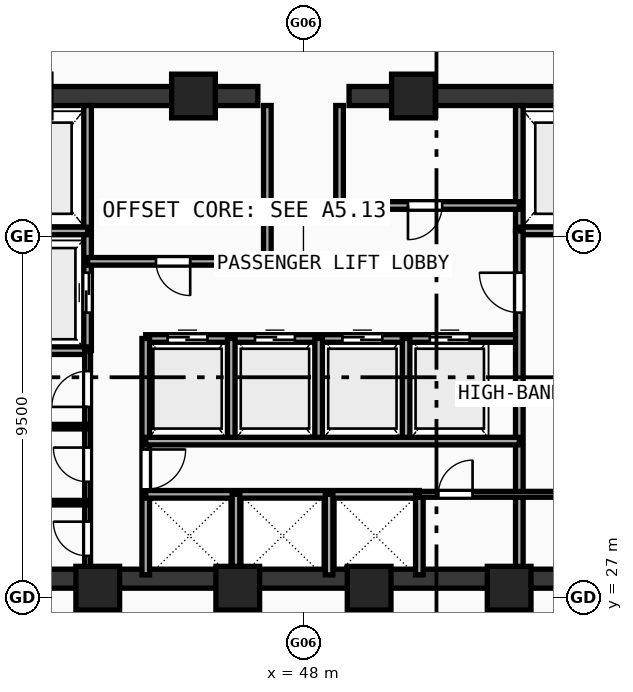
"""IFC4 building model, lengths in metres.
Left out: names, types, materials, properties, quantities, classifications, styles, units other than length and angle.
Written with IfcOpenShell. Run it as: python <this file> out.ifc"""

import sys

from ifc_helpers import new_model, si_unit, direction, frame, frame_2d, origin, origin_with_axes, origin_2d, place, context, subcontext, project, spatial, rectangle, hollow_rectangle, extrude, source, transform, mapped, element, fill, save


model = new_model("IFC4")
c1 = context("Model", 3, precision=1e-05, world=origin(), true_north=direction((0.0, 1.0)))
c2 = subcontext(c1, "Body", "Model", "MODEL_VIEW")
j1 = project(units=[si_unit("LENGTHUNIT", "METRE"), si_unit("PLANEANGLEUNIT", "RADIAN")], contexts=[c1])
p1 = place(None, origin())
s1 = spatial("IfcSite", under=j1, at=p1, CompositionType="ELEMENT")
p2 = place(p1, origin())
s2 = spatial("IfcBuilding", under=s1, at=p2, CompositionType="ELEMENT")
p3 = place(p2, frame((0.0, 0.0, 199.96)))
s3 = spatial("IfcBuildingStorey", under=s2, at=p3, CompositionType="ELEMENT", Elevation=199.96)
p4 = place(p3, frame((35.55, 27.5, 0.0), z_axis=(0.0, 0.0, 1.0), x_axis=(1.0, 0.0, 0.0)))
e1 = element("IfcWall", 1, at=p4, inside=s3, PredefinedType="SHEAR", context=c2, shape_type="SweptSolid", body=[
    extrude(rectangle(XDim=24.9, YDim=0.5, at=frame_2d((12.45, 0.0))), origin(), (0.0, 0.0, 1.0), 3.54),
])
p5 = place(p3, frame((35.55, 40.2, 0.0), z_axis=(0.0, 0.0, 1.0), x_axis=(1.0, 0.0, 0.0)))
e2 = element("IfcWall", 2, at=p5, inside=s3, PredefinedType="SHEAR", context=c2, shape_type="SweptSolid", body=[
    extrude(rectangle(XDim=11.25, YDim=0.5, at=frame_2d((5.625, 0.0))), origin(), (0.0, 0.0, 1.0), 3.54),
])
p6 = place(p5, frame((1.6, 0.0, 0.0)))
e3 = element("IfcOpeningElement", 3, at=p6, cuts=e2, PredefinedType="OPENING", context=c2, shape_type="SweptSolid", body=[
    extrude(rectangle(XDim=1.05, YDim=2.1, at=frame_2d((0.525, 1.05))), frame((0.0, 0.26, 0.0), z_axis=(0.0, -1.0, 0.0), x_axis=(1.0, 0.0, 0.0)), (0.0, 0.0, 1.0), 0.52),
])
p7 = place(p3, frame((49.2, 40.2, 0.0), z_axis=(0.0, 0.0, 1.0), x_axis=(1.0, 0.0, 0.0)))
e4 = element("IfcWall", 4, at=p7, inside=s3, PredefinedType="SHEAR", context=c2, shape_type="SweptSolid", body=[
    extrude(rectangle(XDim=11.25, YDim=0.5, at=frame_2d((5.625, 0.0))), origin(), (0.0, 0.0, 1.0), 3.54),
])
p8 = place(p7, frame((8.6, 0.0, 0.0)))
e5 = element("IfcOpeningElement", 5, at=p8, cuts=e4, PredefinedType="OPENING", context=c2, shape_type="SweptSolid", body=[
    extrude(rectangle(XDim=1.05, YDim=2.1, at=frame_2d((0.525, 1.05))), frame((0.0, 0.26, 0.0), z_axis=(0.0, -1.0, 0.0), x_axis=(1.0, 0.0, 0.0)), (0.0, 0.0, 1.0), 0.52),
])
m1 = source(origin(), c2, "Body", "SweptSolid", [
    extrude(hollow_rectangle(XDim=1.15, YDim=1.15, WallThickness=0.048, at=origin_2d()), origin(), (0.0, 0.0, 1.0), 3.8),
])
for number, where, z_axis, x_axis in (
    (6, (42.588, 27.25, -0.26), (0.0, 0.0, 1.0), (1.0, 0.0, 0.0)),
    (7, (46.272, 27.25, -0.26), (0.0, 0.0, 1.0), (1.0, 0.0, 0.0)),
    (8, (49.729, 27.25, -0.26), (0.0, 0.0, 1.0), (1.0, 0.0, 0.0)),
    (9, (53.412, 27.25, -0.26), (0.0, 0.0, 1.0), (1.0, 0.0, 0.0)),
    (10, (50.894, 40.2, -0.26), (0.0, 0.0, 1.0), (1.0, 0.0, 0.0)),
    (11, (45.106, 40.2, -0.26), (0.0, 0.0, 1.0), (1.0, 0.0, 0.0)),
):
    element("IfcColumn", number, at=place(p3, frame(where, z_axis=z_axis, x_axis=x_axis)), inside=s3, PredefinedType="COLUMN", context=c2, shape_type="MappedRepresentation", body=[
        mapped(m1, transform((0.0, 0.0, 0.0), scale=1.0)),
    ])
p9 = place(p3, frame((42.32, 33.5, 0.0), z_axis=(0.0, 0.0, 1.0), x_axis=(0.0, 1.0, 0.0)))
e12 = element("IfcWall", 12, at=p9, inside=s3, PredefinedType="SOLIDWALL", context=c2, shape_type="SweptSolid", body=[
    extrude(rectangle(XDim=6.45, YDim=0.2, at=frame_2d((3.225, 0.0))), origin(), (0.0, 0.0, 1.0), 3.54),
])
p10 = place(p9, frame((1.0, 0.0, 0.0)))
e13 = element("IfcOpeningElement", 13, at=p10, cuts=e12, PredefinedType="OPENING", context=c2, shape_type="SweptSolid", body=[
    extrude(rectangle(XDim=1.05, YDim=2.1, at=frame_2d((0.525, 1.05))), frame((0.0, 0.11, 0.0), z_axis=(0.0, -1.0, 0.0), x_axis=(1.0, 0.0, 0.0)), (0.0, 0.0, 1.0), 0.22),
])
for number, where, z_axis, x_axis in (
    (14, (39.6, 36.65, 0.0), (0.0, 0.0, 1.0), (1.0, 0.0, 0.0)),
    (15, (39.6, 33.5, 0.0), (0.0, 0.0, 1.0), (1.0, 0.0, 0.0)),
):
    element("IfcWall", number, at=place(p3, frame(where, z_axis=z_axis, x_axis=x_axis)), inside=s3, PredefinedType="SOLIDWALL", context=c2, shape_type="SweptSolid", body=[
        extrude(rectangle(XDim=2.72, YDim=0.2, at=frame_2d((1.36, 0.0))), origin(), (0.0, 0.0, 1.0), 3.54),
    ])
p11 = place(p3, frame((53.68, 36.65, 0.0), z_axis=(0.0, 0.0, 1.0), x_axis=(0.0, 1.0, 0.0)))
e16 = element("IfcWall", 16, at=p11, inside=s3, PredefinedType="SOLIDWALL", context=c2, shape_type="SweptSolid", body=[
    extrude(rectangle(XDim=3.3, YDim=0.2, at=frame_2d((1.65, 0.0))), origin(), (0.0, 0.0, 1.0), 3.54),
])
p12 = place(p3, frame((53.68, 36.65, 0.0), z_axis=(0.0, 0.0, 1.0), x_axis=(1.0, 0.0, 0.0)))
e17 = element("IfcWall", 17, at=p12, inside=s3, PredefinedType="SOLIDWALL", context=c2, shape_type="SweptSolid", body=[
    extrude(rectangle(XDim=2.72, YDim=0.2, at=frame_2d((1.36, 0.0))), origin(), (0.0, 0.0, 1.0), 3.54),
])
p13 = place(p3, frame((42.32, 35.85, 0.0), z_axis=(0.0, 0.0, 1.0), x_axis=(1.0, 0.0, 0.0)))
e18 = element("IfcWall", 18, at=p13, inside=s3, PredefinedType="SOLIDWALL", context=c2, shape_type="SweptSolid", body=[
    extrude(rectangle(XDim=4.73, YDim=0.2, at=frame_2d((2.365, 0.0))), origin(), (0.0, 0.0, 1.0), 3.54),
])
p14 = place(p13, frame((1.8, 0.0, 0.0)))
e19 = element("IfcOpeningElement", 19, at=p14, cuts=e18, PredefinedType="OPENING", context=c2, shape_type="SweptSolid", body=[
    extrude(rectangle(XDim=0.9, YDim=2.1, at=frame_2d((0.45, 1.05))), frame((0.0, 0.11, 0.0), z_axis=(0.0, -1.0, 0.0), x_axis=(1.0, 0.0, 0.0)), (0.0, 0.0, 1.0), 0.22),
])
p15 = place(p3, frame((48.95, 37.32, 0.0), z_axis=(0.0, 0.0, 1.0), x_axis=(1.0, 0.0, 0.0)))
e20 = element("IfcWall", 20, at=p15, inside=s3, PredefinedType="SOLIDWALL", context=c2, shape_type="SweptSolid", body=[
    extrude(rectangle(XDim=4.73, YDim=0.2, at=frame_2d((2.365, 0.0))), origin(), (0.0, 0.0, 1.0), 3.54),
])
p16 = place(p15, frame((1.8, 0.0, 0.0)))
e21 = element("IfcOpeningElement", 21, at=p16, cuts=e20, PredefinedType="OPENING", context=c2, shape_type="SweptSolid", body=[
    extrude(rectangle(XDim=0.9, YDim=2.1, at=frame_2d((0.45, 1.05))), frame((0.0, 0.11, 0.0), z_axis=(0.0, -1.0, 0.0), x_axis=(1.0, 0.0, 0.0)), (0.0, 0.0, 1.0), 0.22),
])
p17 = place(p3, frame((47.05, 35.85, 0.0), z_axis=(0.0, 0.0, 1.0), x_axis=(0.0, 1.0, 0.0)))
e22 = element("IfcWall", 22, at=p17, inside=s3, PredefinedType="SOLIDWALL", context=c2, shape_type="SweptSolid", body=[
    extrude(rectangle(XDim=4.1, YDim=0.2, at=frame_2d((2.05, 0.0))), origin(), (0.0, 0.0, 1.0), 3.54),
])
p18 = place(p3, frame((48.95, 37.32, 0.0), z_axis=(0.0, 0.0, 1.0), x_axis=(0.0, 1.0, 0.0)))
e23 = element("IfcWall", 23, at=p18, inside=s3, PredefinedType="SOLIDWALL", context=c2, shape_type="SweptSolid", body=[
    extrude(rectangle(XDim=2.63, YDim=0.2, at=frame_2d((1.315, 0.0))), origin(), (0.0, 0.0, 1.0), 3.54),
])
p19 = place(p3, frame((43.85, 33.82, 0.0), z_axis=(0.0, 0.0, 1.0), x_axis=(1.0, 0.0, 0.0)))
e24 = element("IfcWall", 24, at=p19, inside=s3, PredefinedType="SOLIDWALL", context=c2, shape_type="SweptSolid", body=[
    extrude(rectangle(XDim=9.83, YDim=0.2, at=frame_2d((4.915, 0.0))), origin(), (0.0, 0.0, 1.0), 3.54),
])
p20 = place(p19, frame((0.575, 0.0, 0.0)))
e25 = element("IfcOpeningElement", 25, at=p20, cuts=e24, PredefinedType="OPENING", context=c2, shape_type="SweptSolid", body=[
    extrude(rectangle(XDim=1.05, YDim=2.1, at=frame_2d((0.525, 1.05))), frame((0.0, 0.11, 0.0), z_axis=(0.0, -1.0, 0.0), x_axis=(1.0, 0.0, 0.0)), (0.0, 0.0, 1.0), 0.22),
])
p21 = place(p19, frame((2.875, 0.0, 0.0)))
e26 = element("IfcOpeningElement", 26, at=p21, cuts=e24, PredefinedType="OPENING", context=c2, shape_type="SweptSolid", body=[
    extrude(rectangle(XDim=1.05, YDim=2.1, at=frame_2d((0.525, 1.05))), frame((0.0, 0.11, 0.0), z_axis=(0.0, -1.0, 0.0), x_axis=(1.0, 0.0, 0.0)), (0.0, 0.0, 1.0), 0.22),
])
p22 = place(p19, frame((5.175, 0.0, 0.0)))
e27 = element("IfcOpeningElement", 27, at=p22, cuts=e24, PredefinedType="OPENING", context=c2, shape_type="SweptSolid", body=[
    extrude(rectangle(XDim=1.05, YDim=2.1, at=frame_2d((0.525, 1.05))), frame((0.0, 0.11, 0.0), z_axis=(0.0, -1.0, 0.0), x_axis=(1.0, 0.0, 0.0)), (0.0, 0.0, 1.0), 0.22),
])
p23 = place(p19, frame((7.475, 0.0, 0.0)))
e28 = element("IfcOpeningElement", 28, at=p23, cuts=e24, PredefinedType="OPENING", context=c2, shape_type="SweptSolid", body=[
    extrude(rectangle(XDim=1.05, YDim=2.1, at=frame_2d((0.525, 1.05))), frame((0.0, 0.11, 0.0), z_axis=(0.0, -1.0, 0.0), x_axis=(1.0, 0.0, 0.0)), (0.0, 0.0, 1.0), 0.22),
])
p24 = place(p3, frame((43.85, 27.6, 0.0), z_axis=(0.0, 0.0, 1.0), x_axis=(0.0, 1.0, 0.0)))
e29 = element("IfcWall", 29, at=p24, inside=s3, PredefinedType="SOLIDWALL", context=c2, shape_type="SweptSolid", body=[
    extrude(rectangle(XDim=6.22, YDim=0.2, at=frame_2d((3.11, 0.0))), origin(), (0.0, 0.0, 1.0), 3.54),
])
p25 = place(p24, frame((2.25, 0.0, 0.0)))
e30 = element("IfcOpeningElement", 30, at=p25, cuts=e29, PredefinedType="OPENING", context=c2, shape_type="SweptSolid", body=[
    extrude(rectangle(XDim=1.05, YDim=2.1, at=frame_2d((0.525, 1.05))), frame((0.0, 0.11, 0.0), z_axis=(0.0, -1.0, 0.0), x_axis=(1.0, 0.0, 0.0)), (0.0, 0.0, 1.0), 0.22),
])
p26 = place(p3, frame((53.68, 27.6, 0.0), z_axis=(0.0, 0.0, 1.0), x_axis=(0.0, 1.0, 0.0)))
e31 = element("IfcWall", 31, at=p26, inside=s3, PredefinedType="SOLIDWALL", context=c2, shape_type="SweptSolid", body=[
    extrude(rectangle(XDim=9.05, YDim=0.2, at=frame_2d((4.525, 0.0))), origin(), (0.0, 0.0, 1.0), 3.54),
])
p27 = place(p26, frame((6.9, 0.0, 0.0)))
e32 = element("IfcOpeningElement", 32, at=p27, cuts=e31, PredefinedType="OPENING", context=c2, shape_type="SweptSolid", body=[
    extrude(rectangle(XDim=1.05, YDim=2.1, at=frame_2d((0.525, 1.05))), frame((0.0, 0.11, 0.0), z_axis=(0.0, -1.0, 0.0), x_axis=(1.0, 0.0, 0.0)), (0.0, 0.0, 1.0), 0.22),
])
for number, where, z_axis, x_axis in (
    (33, (46.1, 31.12, 0.0), (0.0, 0.0, 1.0), (0.0, 1.0, 0.0)),
    (34, (48.4, 31.12, 0.0), (0.0, 0.0, 1.0), (0.0, 1.0, 0.0)),
    (35, (50.7, 31.12, 0.0), (0.0, 0.0, 1.0), (0.0, 1.0, 0.0)),
):
    element("IfcWall", number, at=place(p3, frame(where, z_axis=z_axis, x_axis=x_axis)), inside=s3, PredefinedType="SOLIDWALL", context=c2, shape_type="SweptSolid", body=[
        extrude(rectangle(XDim=2.7, YDim=0.2, at=frame_2d((1.35, 0.0))), origin(), (0.0, 0.0, 1.0), 3.54),
    ])
p28 = place(p3, frame((43.85, 29.72, 0.0), z_axis=(0.0, 0.0, 1.0), x_axis=(1.0, 0.0, 0.0)))
e36 = element("IfcWall", 36, at=p28, inside=s3, PredefinedType="SOLIDWALL", context=c2, shape_type="SweptSolid", body=[
    extrude(rectangle(XDim=7.2, YDim=0.2, at=frame_2d((3.6, 0.0))), origin(), (0.0, 0.0, 1.0), 3.54),
])
p29 = place(p3, frame((51.05, 27.6, 0.0), z_axis=(0.0, 0.0, 1.0), x_axis=(0.0, 1.0, 0.0)))
e37 = element("IfcWall", 37, at=p29, inside=s3, PredefinedType="SOLIDWALL", context=c2, shape_type="SweptSolid", body=[
    extrude(rectangle(XDim=2.12, YDim=0.2, at=frame_2d((1.06, 0.0))), origin(), (0.0, 0.0, 1.0), 3.54),
])
p30 = place(p3, frame((43.85, 31.12, 0.0), z_axis=(0.0, 0.0, 1.0), x_axis=(1.0, 0.0, 0.0)))
e38 = element("IfcWall", 38, at=p30, inside=s3, PredefinedType="SOLIDWALL", context=c2, shape_type="SweptSolid", body=[
    extrude(rectangle(XDim=9.83, YDim=0.2, at=frame_2d((4.915, 0.0))), origin(), (0.0, 0.0, 1.0), 3.54),
])
for number, where, z_axis, x_axis in (
    (39, (46.225, 27.6, 0.0), (0.0, 0.0, 1.0), (0.0, 1.0, 0.0)),
    (40, (48.675, 27.6, 0.0), (0.0, 0.0, 1.0), (0.0, 1.0, 0.0)),
):
    element("IfcWall", number, at=place(p3, frame(where, z_axis=z_axis, x_axis=x_axis)), inside=s3, PredefinedType="SOLIDWALL", context=c2, shape_type="SweptSolid", body=[
        extrude(rectangle(XDim=2.12, YDim=0.2, at=frame_2d((1.06, 0.0))), origin(), (0.0, 0.0, 1.0), 3.54),
    ])
p31 = place(p3, frame((42.32, 27.6, 0.0), z_axis=(0.0, 0.0, 1.0), x_axis=(0.0, 1.0, 0.0)))
e41 = element("IfcWall", 41, at=p31, inside=s3, PredefinedType="PARTITIONING", context=c2, shape_type="SweptSolid", body=[
    extrude(rectangle(XDim=5.9, YDim=0.155, at=frame_2d((2.95, 0.0))), origin(), (0.0, 0.0, 1.0), 3.54),
])
p32 = place(p31, frame((0.5, 0.0, 0.0)))
e42 = element("IfcOpeningElement", 42, at=p32, cuts=e41, PredefinedType="OPENING", context=c2, shape_type="SweptSolid", body=[
    extrude(rectangle(XDim=0.9, YDim=2.1, at=frame_2d((0.45, 1.05))), frame((0.0, 0.087, 0.0), z_axis=(0.0, -1.0, 0.0), x_axis=(1.0, 0.0, 0.0)), (0.0, 0.0, 1.0), 0.175),
])
p33 = place(p31, frame((2.45, 0.0, 0.0)))
e43 = element("IfcOpeningElement", 43, at=p33, cuts=e41, PredefinedType="OPENING", context=c2, shape_type="SweptSolid", body=[
    extrude(rectangle(XDim=0.9, YDim=2.1, at=frame_2d((0.45, 1.05))), frame((0.0, 0.087, 0.0), z_axis=(0.0, -1.0, 0.0), x_axis=(1.0, 0.0, 0.0)), (0.0, 0.0, 1.0), 0.175),
])
p34 = place(p31, frame((4.42, 0.0, 0.0)))
e44 = element("IfcOpeningElement", 44, at=p34, cuts=e41, PredefinedType="OPENING", context=c2, shape_type="SweptSolid", body=[
    extrude(rectangle(XDim=0.94, YDim=2.1, at=frame_2d((0.47, 1.05))), frame((0.0, 0.087, 0.0), z_axis=(0.0, -1.0, 0.0), x_axis=(1.0, 0.0, 0.0)), (0.0, 0.0, 1.0), 0.175),
])
p35 = place(p3, frame((51.05, 29.72, 0.0), z_axis=(0.0, 0.0, 1.0), x_axis=(1.0, 0.0, 0.0)))
e45 = element("IfcWall", 45, at=p35, inside=s3, PredefinedType="PARTITIONING", context=c2, shape_type="SweptSolid", body=[
    extrude(rectangle(XDim=4.07, YDim=0.155, at=frame_2d((2.035, 0.0))), origin(), (0.0, 0.0, 1.0), 3.54),
])
p36 = place(p35, frame((0.5, 0.0, 0.0)))
e46 = element("IfcOpeningElement", 46, at=p36, cuts=e45, PredefinedType="OPENING", context=c2, shape_type="SweptSolid", body=[
    extrude(rectangle(XDim=0.9, YDim=2.1, at=frame_2d((0.45, 1.05))), frame((0.0, 0.087, 0.0), z_axis=(0.0, -1.0, 0.0), x_axis=(1.0, 0.0, 0.0)), (0.0, 0.0, 1.0), 0.175),
])
for number, where, z_axis, x_axis in (
    (47, (39.6, 29.5, 0.0), (0.0, 0.0, 1.0), (1.0, 0.0, 0.0)),
    (48, (39.6, 31.5, 0.0), (0.0, 0.0, 1.0), (1.0, 0.0, 0.0)),
):
    element("IfcWall", number, at=place(p3, frame(where, z_axis=z_axis, x_axis=x_axis)), inside=s3, PredefinedType="PARTITIONING", context=c2, shape_type="SweptSolid", body=[
        extrude(rectangle(XDim=2.72, YDim=0.12, at=frame_2d((1.36, 0.0))), origin(), (0.0, 0.0, 1.0), 3.54),
    ])
m2 = source(origin(), c2, "Body", "SweptSolid", [
    extrude(rectangle(XDim=1.05, YDim=2.1, at=frame_2d((0.525, 1.05))), frame((0.0, 0.025, 0.0), z_axis=(0.0, -1.0, 0.0), x_axis=(1.0, 0.0, 0.0)), (0.0, 0.0, 1.0), 0.05),
])
p37 = place(p10, origin_with_axes())
e49 = element("IfcDoor", 49, at=p37, inside=s3, OperationType="DOUBLE_DOOR_SLIDING", PredefinedType="DOOR", context=c2, shape_type="MappedRepresentation", body=[
    mapped(m2, transform((0.0, 0.0, 0.0), scale=1.0)),
])
fill(e13, e49)
m3 = source(origin(), c2, "Body", "SweptSolid", [
    extrude(rectangle(XDim=0.9, YDim=2.1, at=frame_2d((0.45, 1.05))), frame((0.0, 0.025, 0.0), z_axis=(0.0, -1.0, 0.0), x_axis=(1.0, 0.0, 0.0)), (0.0, 0.0, 1.0), 0.05),
])
p38 = place(p14, frame((0.9, 0.0, 0.0), z_axis=(0.0, 0.0, 1.0), x_axis=(-1.0, 0.0, 0.0)))
e50 = element("IfcDoor", 50, at=p38, inside=s3, OperationType="SINGLE_SWING_LEFT", PredefinedType="DOOR", context=c2, shape_type="MappedRepresentation", body=[
    mapped(m3, transform((0.0, 0.0, 0.0), scale=1.0)),
])
fill(e19, e50)
p39 = place(p16, frame((0.9, 0.0, 0.0), z_axis=(0.0, 0.0, 1.0), x_axis=(-1.0, 0.0, 0.0)))
e51 = element("IfcDoor", 51, at=p39, inside=s3, OperationType="SINGLE_SWING_RIGHT", PredefinedType="DOOR", context=c2, shape_type="MappedRepresentation", body=[
    mapped(m3, transform((0.0, 0.0, 0.0), scale=1.0)),
])
fill(e21, e51)
p40 = place(p20, origin_with_axes())
e52 = element("IfcDoor", 52, at=p40, inside=s3, OperationType="DOUBLE_DOOR_SLIDING", PredefinedType="DOOR", context=c2, shape_type="MappedRepresentation", body=[
    mapped(m2, transform((0.0, 0.0, 0.0), scale=1.0)),
])
fill(e25, e52)
p41 = place(p21, origin_with_axes())
e53 = element("IfcDoor", 53, at=p41, inside=s3, OperationType="DOUBLE_DOOR_SLIDING", PredefinedType="DOOR", context=c2, shape_type="MappedRepresentation", body=[
    mapped(m2, transform((0.0, 0.0, 0.0), scale=1.0)),
])
fill(e26, e53)
p42 = place(p22, origin_with_axes())
e54 = element("IfcDoor", 54, at=p42, inside=s3, OperationType="DOUBLE_DOOR_SLIDING", PredefinedType="DOOR", context=c2, shape_type="MappedRepresentation", body=[
    mapped(m2, transform((0.0, 0.0, 0.0), scale=1.0)),
])
fill(e27, e54)
p43 = place(p23, origin_with_axes())
e55 = element("IfcDoor", 55, at=p43, inside=s3, OperationType="DOUBLE_DOOR_SLIDING", PredefinedType="DOOR", context=c2, shape_type="MappedRepresentation", body=[
    mapped(m2, transform((0.0, 0.0, 0.0), scale=1.0)),
])
fill(e28, e55)
p44 = place(p25, frame((1.05, 0.0, 0.0), z_axis=(0.0, 0.0, 1.0), x_axis=(-1.0, 0.0, 0.0)))
e56 = element("IfcDoor", 56, at=p44, inside=s3, OperationType="SINGLE_SWING_LEFT", PredefinedType="DOOR", context=c2, shape_type="MappedRepresentation", body=[
    mapped(m2, transform((0.0, 0.0, 0.0), scale=1.0)),
])
fill(e30, e56)
p45 = place(p27, origin_with_axes())
e57 = element("IfcDoor", 57, at=p45, inside=s3, OperationType="SINGLE_SWING_RIGHT", PredefinedType="DOOR", context=c2, shape_type="MappedRepresentation", body=[
    mapped(m2, transform((0.0, 0.0, 0.0), scale=1.0)),
])
fill(e32, e57)
p46 = place(p32, origin_with_axes())
e58 = element("IfcDoor", 58, at=p46, inside=s3, OperationType="SINGLE_SWING_RIGHT", PredefinedType="DOOR", context=c2, shape_type="MappedRepresentation", body=[
    mapped(m3, transform((0.0, 0.0, 0.0), scale=1.0)),
])
fill(e42, e58)
p47 = place(p33, origin_with_axes())
e59 = element("IfcDoor", 59, at=p47, inside=s3, OperationType="SINGLE_SWING_RIGHT", PredefinedType="DOOR", context=c2, shape_type="MappedRepresentation", body=[
    mapped(m3, transform((0.0, 0.0, 0.0), scale=1.0)),
])
fill(e43, e59)
m4 = source(origin(), c2, "Body", "SweptSolid", [
    extrude(rectangle(XDim=0.94, YDim=2.1, at=frame_2d((0.47, 1.05))), frame((0.0, 0.025, 0.0), z_axis=(0.0, -1.0, 0.0), x_axis=(1.0, 0.0, 0.0)), (0.0, 0.0, 1.0), 0.05),
])
p48 = place(p34, origin_with_axes())
e60 = element("IfcDoor", 60, at=p48, inside=s3, OperationType="SINGLE_SWING_LEFT", PredefinedType="DOOR", context=c2, shape_type="MappedRepresentation", body=[
    mapped(m4, transform((0.0, 0.0, 0.0), scale=1.0)),
])
fill(e44, e60)
p49 = place(p36, origin_with_axes())
e61 = element("IfcDoor", 61, at=p49, inside=s3, OperationType="SINGLE_SWING_RIGHT", PredefinedType="DOOR", context=c2, shape_type="MappedRepresentation", body=[
    mapped(m3, transform((0.0, 0.0, 0.0), scale=1.0)),
])
fill(e46, e61)
save(model, sys.argv[1])
